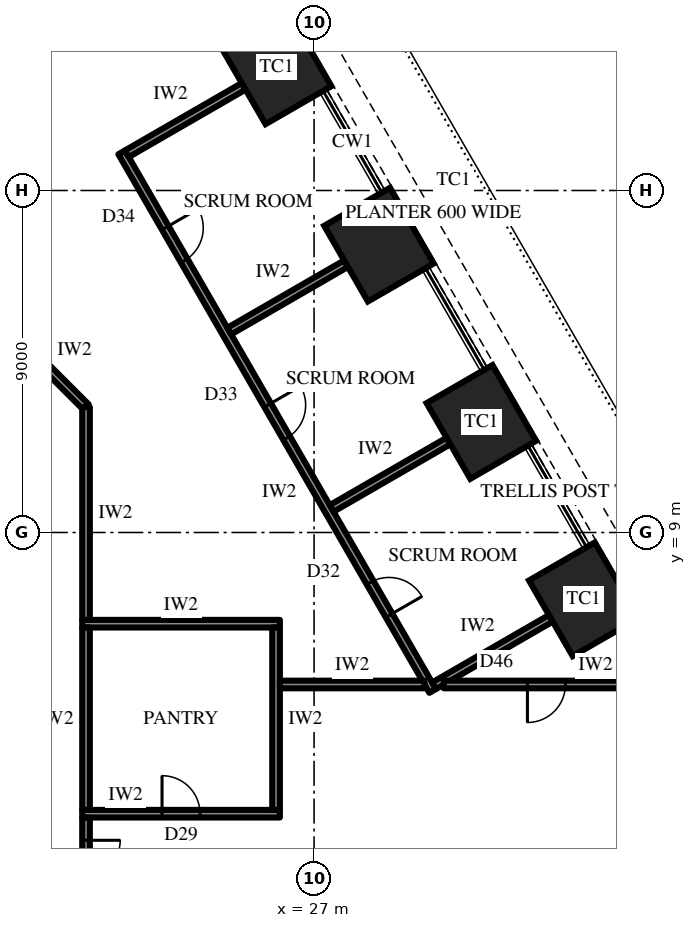
"""IFC4 building model, lengths in metres.
Left out: names, types, materials, properties, quantities, classifications, styles, units other than length and angle.
Written with IfcOpenShell. Run it as: python <this file> out.ifc"""

import sys

from ifc_helpers import new_model, si_unit, direction, frame, frame_2d, origin, origin_2d, place, context, subcontext, project, spatial, rectangle, extrude, element, fill, save


model = new_model("IFC4")
c1 = context("Model", 3, precision=1e-05, world=origin(), true_north=direction((0.0, 1.0)))
c2 = subcontext(c1, "Body", "Model", "MODEL_VIEW")
j1 = project(units=[si_unit("LENGTHUNIT", "METRE"), si_unit("PLANEANGLEUNIT", "RADIAN")], contexts=[c1])
p1 = place(None, origin())
s1 = spatial("IfcSite", under=j1, at=p1, CompositionType="ELEMENT")
p2 = place(p1, origin())
s2 = spatial("IfcBuilding", under=s1, at=p2, CompositionType="ELEMENT")
p3 = place(p2, frame((0.0, 0.0, 40.3)))
s3 = spatial("IfcBuildingStorey", under=s2, at=p3, CompositionType="ELEMENT", Elevation=40.3)
for number, where, z_axis, x_axis in (
    (1, (34.097, 7.242, 0.0), (0.0, 0.0, 1.0), (-0.5, 0.866, 0.0)),
    (2, (31.403, 11.908, 0.0), (0.0, 0.0, 1.0), (-0.5, 0.866, 0.0)),
    (3, (28.709, 16.575, 0.0), (0.0, 0.0, 1.0), (-0.5, 0.866, 0.0)),
    (4, (26.014, 21.242, 0.0), (0.0, 0.0, 1.0), (-0.5, 0.866, 0.0)),
):
    element("IfcColumn", number, at=place(p3, frame(where, z_axis=z_axis, x_axis=x_axis)), inside=s3, PredefinedType="COLUMN", context=c2, shape_type="SweptSolid", body=[
        extrude(rectangle(XDim=2.3, YDim=2.0, at=origin_2d()), origin(), (0.0, 0.0, 1.0), 4.2),
    ])
p4 = place(p3, frame((30.12, 4.83, 0.0), z_axis=(0.0, 0.0, 1.0), x_axis=(-0.500000949028, 0.866024855862, 0.0)))
e5 = element("IfcWall", 5, at=p4, inside=s3, PredefinedType="PARTITIONING", context=c2, shape_type="SweptSolid", body=[
    extrude(rectangle(XDim=16.366, YDim=0.2, at=frame_2d((8.183, 0.0))), origin(), (0.0, 0.0, 1.0), 4.0),
])
p5 = place(p4, frame((2.294, 0.0, 0.0)))
e6 = element("IfcOpeningElement", 6, at=p5, cuts=e5, PredefinedType="OPENING", context=c2, shape_type="SweptSolid", body=[
    extrude(rectangle(XDim=1.0, YDim=2.2, at=frame_2d((0.5, 1.1))), frame((0.0, 0.11, 0.0), z_axis=(0.0, -1.0, 0.0), x_axis=(1.0, 0.0, 0.0)), (0.0, 0.0, 1.0), 0.22),
])
p6 = place(p4, frame((7.683, 0.0, 0.0)))
e7 = element("IfcOpeningElement", 7, at=p6, cuts=e5, PredefinedType="OPENING", context=c2, shape_type="SweptSolid", body=[
    extrude(rectangle(XDim=1.0, YDim=2.2, at=frame_2d((0.5, 1.1))), frame((0.0, 0.11, 0.0), z_axis=(0.0, -1.0, 0.0), x_axis=(1.0, 0.0, 0.0)), (0.0, 0.0, 1.0), 0.22),
])
p7 = place(p4, frame((13.072, 0.0, 0.0)))
e8 = element("IfcOpeningElement", 8, at=p7, cuts=e5, PredefinedType="OPENING", context=c2, shape_type="SweptSolid", body=[
    extrude(rectangle(XDim=1.0, YDim=2.2, at=frame_2d((0.5, 1.1))), frame((0.0, 0.11, 0.0), z_axis=(0.0, -1.0, 0.0), x_axis=(1.0, 0.0, 0.0)), (0.0, 0.0, 1.0), 0.22),
])
p8 = place(p3, frame((30.157, 4.967, 0.0), z_axis=(0.0, 0.0, 1.0), x_axis=(0.865995461329, 0.500051858269, 0.0)))
e9 = element("IfcWall", 9, at=p8, inside=s3, PredefinedType="PARTITIONING", context=c2, shape_type="SweptSolid", body=[
    extrude(rectangle(XDim=3.55, YDim=0.2, at=frame_2d((1.775, 0.0))), origin(), (0.0, 0.0, 1.0), 2.944),
])
p9 = place(p3, frame((27.463, 9.633, 0.0), z_axis=(0.0, 0.0, 1.0), x_axis=(0.866012656725, 0.500022077904, 0.0)))
e10 = element("IfcWall", 10, at=p9, inside=s3, PredefinedType="PARTITIONING", context=c2, shape_type="SweptSolid", body=[
    extrude(rectangle(XDim=3.55, YDim=0.2, at=frame_2d((1.775, 0.0))), origin(), (0.0, 0.0, 1.0), 2.944),
])
p10 = place(p3, frame((24.768, 14.3, 0.0), z_axis=(0.0, 0.0, 1.0), x_axis=(0.8660424351, 0.499970499736, 0.0)))
e11 = element("IfcWall", 11, at=p10, inside=s3, PredefinedType="PARTITIONING", context=c2, shape_type="SweptSolid", body=[
    extrude(rectangle(XDim=3.55, YDim=0.2, at=frame_2d((1.775, 0.0))), origin(), (0.0, 0.0, 1.0), 4.0),
])
p11 = place(p3, frame((22.074, 18.967, 0.0), z_axis=(0.0, 0.0, 1.0), x_axis=(0.866012656725, 0.500022077904, 0.0)))
e12 = element("IfcWall", 12, at=p11, inside=s3, PredefinedType="PARTITIONING", context=c2, shape_type="SweptSolid", body=[
    extrude(rectangle(XDim=3.55, YDim=0.2, at=frame_2d((1.775, 0.0))), origin(), (0.0, 0.0, 1.0), 2.992),
])
p12 = place(p3, frame((20.9, 1.6, 0.0), z_axis=(0.0, 0.0, 1.0), x_axis=(1.0, 0.0, 0.0)))
e13 = element("IfcWall", 13, at=p12, inside=s3, PredefinedType="PARTITIONING", context=c2, shape_type="SweptSolid", body=[
    extrude(rectangle(XDim=5.2, YDim=0.2, at=frame_2d((2.6, 0.0))), origin(), (0.0, 0.0, 1.0), 4.0),
])
p13 = place(p12, frame((2.1, 0.0, 0.0)))
e14 = element("IfcOpeningElement", 14, at=p13, cuts=e13, PredefinedType="OPENING", context=c2, shape_type="SweptSolid", body=[
    extrude(rectangle(XDim=1.0, YDim=2.2, at=frame_2d((0.5, 1.1))), frame((0.0, 0.11, 0.0), z_axis=(0.0, -1.0, 0.0), x_axis=(1.0, 0.0, 0.0)), (0.0, 0.0, 1.0), 0.22),
])
p14 = place(p3, frame((20.9, 6.6, 0.0), z_axis=(0.0, 0.0, 1.0), x_axis=(1.0, 0.0, 0.0)))
e15 = element("IfcWall", 15, at=p14, inside=s3, PredefinedType="PARTITIONING", context=c2, shape_type="SweptSolid", body=[
    extrude(rectangle(XDim=5.2, YDim=0.2, at=frame_2d((2.6, 0.0))), origin(), (0.0, 0.0, 1.0), 4.0),
])
for number, where, z_axis, x_axis in (
    (16, (21.0, 1.7, 0.0), (0.0, 0.0, 1.0), (0.0, 1.0, 0.0)),
    (17, (26.0, 1.7, 0.0), (0.0, 0.0, 1.0), (0.0, 1.0, 0.0)),
):
    element("IfcWall", number, at=place(p3, frame(where, z_axis=z_axis, x_axis=x_axis)), inside=s3, PredefinedType="PARTITIONING", context=c2, shape_type="SweptSolid", body=[
        extrude(rectangle(XDim=4.8, YDim=0.2, at=frame_2d((2.4, 0.0))), origin(), (0.0, 0.0, 1.0), 4.0),
    ])
p15 = place(p3, frame((19.2, 14.1, 0.0), z_axis=(0.0, 0.0, 1.0), x_axis=(0.707106781187, -0.707106781187, 0.0)))
e18 = element("IfcWall", 18, at=p15, inside=s3, PredefinedType="PARTITIONING", context=c2, shape_type="SweptSolid", body=[
    extrude(rectangle(XDim=2.546, YDim=0.2, at=frame_2d((1.273, 0.0))), origin(), (0.0, 0.0, 1.0), 4.0),
])
p16 = place(p3, frame((21.0, 1.499, 0.0), z_axis=(0.0, 0.0, 1.0), x_axis=(0.0, -1.0, 0.0)))
e19 = element("IfcWall", 19, at=p16, inside=s3, PredefinedType="PARTITIONING", context=c2, shape_type="SweptSolid", body=[
    extrude(rectangle(XDim=2.998, YDim=0.2, at=frame_2d((1.499, 0.0))), origin(), (0.0, 0.0, 1.0), 4.0),
])
p17 = place(p16, frame((0.599, 0.0, 0.0)))
e20 = element("IfcOpeningElement", 20, at=p17, cuts=e19, PredefinedType="OPENING", context=c2, shape_type="SweptSolid", body=[
    extrude(rectangle(XDim=1.8, YDim=2.4, at=frame_2d((0.9, 1.2))), frame((0.0, 0.11, 0.0), z_axis=(0.0, -1.0, 0.0), x_axis=(1.0, 0.0, 0.0)), (0.0, 0.0, 1.0), 0.22),
])
p18 = place(p3, frame((21.0, 12.3, 0.0), z_axis=(0.0, 0.0, 1.0), x_axis=(0.0, -1.0, 0.0)))
e21 = element("IfcWall", 21, at=p18, inside=s3, PredefinedType="PARTITIONING", context=c2, shape_type="SweptSolid", body=[
    extrude(rectangle(XDim=5.599, YDim=0.2, at=frame_2d((2.8, 0.0))), origin(), (0.0, 0.0, 1.0), 4.0),
])
p19 = place(p3, frame((26.1, 5.0, 0.0), z_axis=(0.0, 0.0, 1.0), x_axis=(1.0, 0.0, 0.0)))
e22 = element("IfcWall", 22, at=p19, inside=s3, PredefinedType="PARTITIONING", context=c2, shape_type="SweptSolid", body=[
    extrude(rectangle(XDim=3.807, YDim=0.2, at=frame_2d((1.903, 0.0))), origin(), (0.0, 0.0, 1.0), 4.0),
])
p20 = place(p3, frame((30.415, 5.0, 0.0), z_axis=(0.0, 0.0, 1.0), x_axis=(1.0, 0.0, 0.0)))
e23 = element("IfcWall", 23, at=p20, inside=s3, PredefinedType="PARTITIONING", context=c2, shape_type="SweptSolid", body=[
    extrude(rectangle(XDim=5.704, YDim=0.2, at=frame_2d((2.852, 0.0))), origin(), (0.0, 0.0, 1.0), 4.0),
])
p21 = place(p20, frame((2.2, 0.0, 0.0)))
e24 = element("IfcOpeningElement", 24, at=p21, cuts=e23, PredefinedType="OPENING", context=c2, shape_type="SweptSolid", body=[
    extrude(rectangle(XDim=1.0, YDim=2.2, at=frame_2d((0.5, 1.1))), frame((0.0, 0.11, 0.0), z_axis=(0.0, -1.0, 0.0), x_axis=(1.0, 0.0, 0.0)), (0.0, 0.0, 1.0), 0.22),
])
p22 = place(p5, frame((1.0, 0.0, 0.0), z_axis=(0.0, 0.0, 1.0), x_axis=(-1.0, 0.0, 0.0)))
e25 = element("IfcDoor", 25, at=p22, inside=s3, OperationType="SINGLE_SWING_LEFT", PredefinedType="DOOR", context=c2, shape_type="SweptSolid", body=[
    extrude(rectangle(XDim=1.0, YDim=2.2, at=frame_2d((0.5, 1.1))), frame((0.0, 0.025, 0.0), z_axis=(0.0, -1.0, 0.0), x_axis=(1.0, 0.0, 0.0)), (0.0, 0.0, 1.0), 0.05),
])
fill(e6, e25)
p23 = place(p6, frame((1.0, 0.0, 0.0), z_axis=(0.0, 0.0, 1.0), x_axis=(-1.0, 0.0, 0.0)))
e26 = element("IfcDoor", 26, at=p23, inside=s3, OperationType="SINGLE_SWING_RIGHT", PredefinedType="DOOR", context=c2, shape_type="SweptSolid", body=[
    extrude(rectangle(XDim=1.0, YDim=2.2, at=frame_2d((0.5, 1.1))), frame((0.0, 0.025, 0.0), z_axis=(0.0, -1.0, 0.0), x_axis=(1.0, 0.0, 0.0)), (0.0, 0.0, 1.0), 0.05),
])
fill(e7, e26)
p24 = place(p7, frame((1.0, 0.0, 0.0), z_axis=(0.0, 0.0, 1.0), x_axis=(-1.0, 0.0, 0.0)))
e27 = element("IfcDoor", 27, at=p24, inside=s3, OperationType="SINGLE_SWING_RIGHT", PredefinedType="DOOR", context=c2, shape_type="SweptSolid", body=[
    extrude(rectangle(XDim=1.0, YDim=2.2, at=frame_2d((0.5, 1.1))), frame((0.0, 0.025, 0.0), z_axis=(0.0, -1.0, 0.0), x_axis=(1.0, 0.0, 0.0)), (0.0, 0.0, 1.0), 0.05),
])
fill(e8, e27)
p25 = place(p13, origin())
e28 = element("IfcDoor", 28, at=p25, inside=s3, OperationType="SINGLE_SWING_RIGHT", PredefinedType="DOOR", context=c2, shape_type="SweptSolid", body=[
    extrude(rectangle(XDim=1.0, YDim=2.2, at=frame_2d((0.5, 1.1))), frame((0.0, 0.025, 0.0), z_axis=(0.0, -1.0, 0.0), x_axis=(1.0, 0.0, 0.0)), (0.0, 0.0, 1.0), 0.05),
])
fill(e14, e28)
p26 = place(p17, origin())
e29 = element("IfcDoor", 29, at=p26, inside=s3, OperationType="DOUBLE_DOOR_SINGLE_SWING", PredefinedType="DOOR", context=c2, shape_type="SweptSolid", body=[
    extrude(rectangle(XDim=1.8, YDim=2.4, at=frame_2d((0.9, 1.2))), frame((0.0, 0.025, 0.0), z_axis=(0.0, -1.0, 0.0), x_axis=(1.0, 0.0, 0.0)), (0.0, 0.0, 1.0), 0.05),
])
fill(e20, e29)
p27 = place(p21, frame((1.0, 0.0, 0.0), z_axis=(0.0, 0.0, 1.0), x_axis=(-1.0, 0.0, 0.0)))
e30 = element("IfcDoor", 30, at=p27, inside=s3, OperationType="SINGLE_SWING_LEFT", PredefinedType="DOOR", context=c2, shape_type="SweptSolid", body=[
    extrude(rectangle(XDim=1.0, YDim=2.2, at=frame_2d((0.5, 1.1))), frame((0.0, 0.025, 0.0), z_axis=(0.0, -1.0, 0.0), x_axis=(1.0, 0.0, 0.0)), (0.0, 0.0, 1.0), 0.05),
])
fill(e24, e30)
save(model, sys.argv[1])
